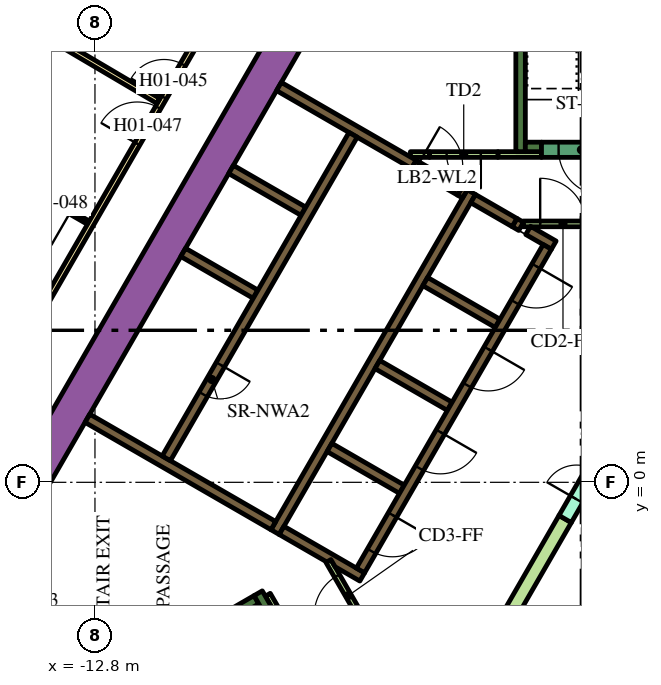
"""IFC4 building model, lengths in metres.
Left out: names, types, materials, properties, quantities, classifications, styles, units other than length and angle.
Written with IfcOpenShell. Run it as: python <this file> out.ifc"""

import sys

from ifc_helpers import new_model, si_unit, direction, frame, frame_2d, origin, place, context, subcontext, project, spatial, polyline, rectangle, outline, extrude, element, fill, save


model = new_model("IFC4")
c1 = context("Model", 3, precision=1e-05, world=origin(), true_north=direction((0.0, 1.0)))
c2 = subcontext(c1, "Body", "Model", "MODEL_VIEW")
j1 = project(units=[si_unit("LENGTHUNIT", "METRE"), si_unit("PLANEANGLEUNIT", "RADIAN")], contexts=[c1])
p1 = place(None, origin())
s1 = spatial("IfcSite", under=j1, at=p1, CompositionType="ELEMENT")
p2 = place(p1, origin())
s2 = spatial("IfcBuilding", under=s1, at=p2, CompositionType="ELEMENT")
p3 = place(p2, frame((0.0, 0.0, 35.4)))
s3 = spatial("IfcBuildingStorey", under=s2, at=p3, CompositionType="ELEMENT", Elevation=35.4)
p4 = place(p3, frame((-15.36, -1.503, 0.0), z_axis=(0.0, 0.0, 1.0), x_axis=(0.50000389221, 0.866023156604, 0.0)))
e1 = element("IfcWall", 1, at=p4, inside=s3, PredefinedType="SOLIDWALL", context=c2, shape_type="SweptSolid", body=[
    extrude(rectangle(XDim=21.0, YDim=0.9, at=frame_2d((10.5, 0.0))), origin(), (0.0, 0.0, 1.0), 3.9),
])
p5 = place(p3, frame((-1.6, 8.7, 0.0), z_axis=(0.0, 0.0, 1.0), x_axis=(0.0, 1.0, 0.0)))
e2 = element("IfcWall", 2, at=p5, inside=s3, PredefinedType="SOLIDWALL", context=c2, shape_type="SweptSolid", body=[
    extrude(rectangle(XDim=7.05, YDim=0.25, at=frame_2d((3.525, 0.0))), origin(), (0.0, 0.0, 1.0), 3.9),
])
p6 = place(p3, frame((-1.475, 8.825, 0.0), z_axis=(0.0, 0.0, 1.0), x_axis=(1.0, 0.0, 0.0)))
e3 = element("IfcWall", 3, at=p6, inside=s3, PredefinedType="SOLIDWALL", context=c2, shape_type="SweptSolid", body=[
    extrude(rectangle(XDim=0.425, YDim=0.25, at=frame_2d((0.212, 0.0))), origin(), (0.0, 0.0, 1.0), 3.9),
])
p7 = place(p3, frame((-14.44, -6.49, 0.0), z_axis=(0.0, 0.0, 1.0), x_axis=(0.866022966069, 0.500004222222, 0.0)))
e4 = element("IfcWall", 4, at=p7, inside=s3, PredefinedType="SOLIDWALL", context=c2, shape_type="SweptSolid", body=[
    extrude(rectangle(XDim=6.8, YDim=0.25, at=frame_2d((3.4, 0.0))), origin(), (0.0, 0.0, 1.0), 3.9),
])
p8 = place(p3, frame((-8.168, -3.503, 0.0), z_axis=(0.0, 0.0, 1.0), x_axis=(-0.499952099219, 0.866053057547, 0.0)))
e5 = element("IfcWall", 5, at=p8, inside=s3, PredefinedType="SOLIDWALL", context=c2, shape_type="SweptSolid", body=[
    extrude(rectangle(XDim=0.675, YDim=0.25, at=frame_2d((0.337, 0.0))), origin(), (0.0, 0.0, 1.0), 3.9),
])
p9 = place(p3, frame((-8.06, -1.311, 0.0), z_axis=(0.0, 0.0, 1.0), x_axis=(0.50000273126, 0.866023826885, 0.0)))
e6 = element("IfcWall", 6, at=p9, inside=s3, PredefinedType="SOLIDWALL", context=c2, shape_type="SweptSolid", body=[
    extrude(rectangle(XDim=10.33, YDim=0.25, at=frame_2d((5.165, 0.0))), origin(), (0.0, 0.0, 1.0), 3.9),
])
p10 = place(p3, frame((-1.758, 6.835, 0.0), z_axis=(0.0, 0.0, 1.0), x_axis=(0.865982457891, -0.500074377092, 0.0)))
e7 = element("IfcWall", 7, at=p10, inside=s3, PredefinedType="SOLIDWALL", context=c2, shape_type="SweptSolid", body=[
    extrude(rectangle(XDim=0.2, YDim=0.25, at=frame_2d((0.1, 0.0))), origin(), (0.0, 0.0, 1.0), 3.9),
])
p11 = place(p3, frame((-1.76, 6.836, 0.0), z_axis=(0.0, 0.0, 1.0), x_axis=(-0.865952863304, 0.500125622755, 0.0)))
e8 = element("IfcWall", 8, at=p11, inside=s3, PredefinedType="SOLIDWALL", context=c2, shape_type="SweptSolid", body=[
    extrude(rectangle(XDim=1.258, YDim=0.25, at=frame_2d((0.629, 0.0))), origin(), (0.0, 0.0, 1.0), 3.9),
])
p12 = place(p3, frame((-0.728, 6.24, 0.0), z_axis=(0.0, 0.0, 1.0), x_axis=(-0.865955664968, 0.500120771724, 0.0)))
e9 = element("IfcWall", 9, at=p12, inside=s3, PredefinedType="SOLIDWALL", context=c2, shape_type="SweptSolid", body=[
    extrude(rectangle(XDim=0.778, YDim=0.25, at=frame_2d((0.389, 0.0))), origin(), (0.0, 0.0, 1.0), 3.9),
])
for number, where, z_axis, x_axis in (
    (10, (-2.204, 4.182, 0.0), (0.0, 0.0, 1.0), (-0.866, 0.5, 0.0)),
    (11, (-5.369, 3.1, 0.0), (0.0, 0.0, 1.0), (0.866, -0.5, 0.0)),
    (12, (-4.724, -0.182, 0.0), (0.0, 0.0, 1.0), (-0.866, 0.5, 0.0)),
):
    element("IfcWall", number, at=place(p3, frame(where, z_axis=z_axis, x_axis=x_axis)), inside=s3, PredefinedType="SOLIDWALL", context=c2, shape_type="SweptSolid", body=[
        extrude(rectangle(XDim=2.2, YDim=0.25, at=frame_2d((1.1, 0.0))), origin(), (0.0, 0.0, 1.0), 3.9),
    ])
p13 = place(p3, origin())
e13 = element("IfcWall", 13, at=p13, inside=s3, PredefinedType="SOLIDWALL", context=c2, shape_type="SweptSolid", body=[
    extrude(outline(polyline([(-5.922, -2.257), (-5.922, -2.257), (-5.705, -2.382), (-5.83, -2.598), (-6.483, -2.221), (-6.591, -2.033), (-6.591, -2.033), (-6.7, -2.096), (-7.952, -1.373), (-7.827, -1.156), (-5.922, -2.257)])), origin(), (0.0, 0.0, 1.0), 3.9),
])
p14 = place(p3, frame((-8.106, -1.14, 0.0), z_axis=(0.0, 0.0, 1.0), x_axis=(-0.866000643155, 0.500042884217, 0.0)))
e14 = element("IfcWall", 14, at=p14, inside=s3, PredefinedType="SOLIDWALL", context=c2, shape_type="SweptSolid", body=[
    extrude(rectangle(XDim=5.65, YDim=0.25, at=frame_2d((2.825, 0.0))), origin(), (0.0, 0.0, 1.0), 3.9),
])
e15 = element("IfcWall", 15, at=p13, inside=s3, PredefinedType="SOLIDWALL", context=c2, shape_type="SweptSolid", body=[
    extrude(outline(polyline([(-3.128, 7.481), (-3.259, 7.557), (-3.134, 7.773), (-3.003, 7.698), (-3.128, 7.481)])), origin(), (0.0, 0.0, 1.0), 3.9),
])
for number, where, z_axis, x_axis in (
    (16, (-8.574, 4.95, 0.0), (0.0, 0.0, 1.0), (-0.866, 0.5, 0.0)),
    (17, (-7.314, 7.132, 0.0), (0.0, 0.0, 1.0), (-0.866, 0.5, 0.0)),
):
    element("IfcWall", number, at=place(p3, frame(where, z_axis=z_axis, x_axis=x_axis)), inside=s3, PredefinedType="SOLIDWALL", context=c2, shape_type="SweptSolid", body=[
        extrude(rectangle(XDim=2.2, YDim=0.25, at=frame_2d((1.1, 0.0))), origin(), (0.0, 0.0, 1.0), 3.9),
    ])
p15 = place(p3, frame((-7.959, 10.415, 0.0), z_axis=(0.0, 0.0, 1.0), x_axis=(0.866020958405, -0.500007699544, 0.0)))
e18 = element("IfcWall", 18, at=p15, inside=s3, PredefinedType="SOLIDWALL", context=c2, shape_type="SweptSolid", body=[
    extrude(rectangle(XDim=4.1, YDim=0.25, at=frame_2d((2.05, 0.0))), origin(), (0.0, 0.0, 1.0), 3.9),
])
p16 = place(p3, frame((-8.252, -2.958, 0.0), z_axis=(0.0, 0.0, 1.0), x_axis=(0.500174715838, -0.865924508047, 0.0)))
e19 = element("IfcWall", 19, at=p16, inside=s3, PredefinedType="PARTITIONING", context=c2, shape_type="SweptSolid", body=[
    extrude(rectangle(XDim=0.514, YDim=0.15, at=frame_2d((0.257, 0.0))), origin(), (0.0, 0.0, 1.0), 2.75),
])
p17 = place(p3, frame((-3.997, 8.625, 0.0), z_axis=(0.0, 0.0, 1.0), x_axis=(-1.0, 0.0, 0.0)))
e20 = element("IfcWall", 20, at=p17, inside=s3, PredefinedType="PARTITIONING", context=c2, shape_type="SweptSolid", body=[
    extrude(rectangle(XDim=0.502, YDim=0.15, at=frame_2d((0.251, 0.0))), origin(), (0.0, 0.0, 1.0), 2.75),
])
p18 = place(p3, frame((-2.196, 8.625, 0.0), z_axis=(0.0, 0.0, 1.0), x_axis=(1.0, 0.0, 0.0)))
e21 = element("IfcWall", 21, at=p18, inside=s3, PredefinedType="PARTITIONING", context=c2, shape_type="SweptSolid", body=[
    extrude(rectangle(XDim=1.146, YDim=0.15, at=frame_2d((0.573, 0.0))), origin(), (0.0, 0.0, 1.0), 2.75),
])
e22 = element("IfcWall", 22, at=p13, inside=s3, PredefinedType="PARTITIONING", context=c2, shape_type="SweptSolid", body=[
    extrude(outline(polyline([(-0.59, -0.872), (-0.265, -1.059), (-1.822, -3.756), (-2.147, -3.568), (-0.59, -0.872)])), origin(), (0.0, 0.0, 1.0), 2.75),
])
p19 = place(p3, frame((-6.008, 9.144, 0.0), z_axis=(0.0, 0.0, 1.0), x_axis=(-0.500006956611, -0.866021387346, 0.0)))
e23 = element("IfcWall", 23, at=p19, inside=s3, PredefinedType="SOLIDWALL", context=c2, shape_type="SweptSolid", body=[
    extrude(rectangle(XDim=9.83, YDim=0.25, at=frame_2d((4.915, 0.0))), origin(), (0.0, 0.0, 1.0), 3.9),
])
p20 = place(p19, frame((6.985, 0.0, 0.0)))
e24 = element("IfcOpeningElement", 24, at=p20, cuts=e23, PredefinedType="OPENING", context=c2, shape_type="SweptSolid", body=[
    extrude(rectangle(XDim=0.9, YDim=2.1, at=frame_2d((0.45, 1.05))), frame((0.0, 0.135, 0.0), z_axis=(0.0, -1.0, 0.0), x_axis=(1.0, 0.0, 0.0)), (0.0, 0.0, 1.0), 0.27),
])
p21 = place(p3, frame((-0.898, 6.194, 0.0), z_axis=(0.0, 0.0, 1.0), x_axis=(-0.499996202215, -0.866027596426, 0.0)))
e25 = element("IfcWall", 25, at=p21, inside=s3, PredefinedType="SOLIDWALL", context=c2, shape_type="SweptSolid", body=[
    extrude(rectangle(XDim=9.83, YDim=0.25, at=frame_2d((4.915, 0.0))), origin(), (0.0, 0.0, 1.0), 3.9),
])
p22 = place(p21, frame((0.585, 0.0, 0.0)))
e26 = element("IfcOpeningElement", 26, at=p22, cuts=e25, PredefinedType="OPENING", context=c2, shape_type="SweptSolid", body=[
    extrude(rectangle(XDim=1.1, YDim=2.1, at=frame_2d((0.55, 1.05))), frame((0.0, 0.135, 0.0), z_axis=(0.0, -1.0, 0.0), x_axis=(1.0, 0.0, 0.0)), (0.0, 0.0, 1.0), 0.27),
])
p23 = place(p21, frame((3.105, 0.0, 0.0)))
e27 = element("IfcOpeningElement", 27, at=p23, cuts=e25, PredefinedType="OPENING", context=c2, shape_type="SweptSolid", body=[
    extrude(rectangle(XDim=1.1, YDim=2.1, at=frame_2d((0.55, 1.05))), frame((0.0, 0.135, 0.0), z_axis=(0.0, -1.0, 0.0), x_axis=(1.0, 0.0, 0.0)), (0.0, 0.0, 1.0), 0.27),
])
p24 = place(p21, frame((5.625, 0.0, 0.0)))
e28 = element("IfcOpeningElement", 28, at=p24, cuts=e25, PredefinedType="OPENING", context=c2, shape_type="SweptSolid", body=[
    extrude(rectangle(XDim=1.1, YDim=2.1, at=frame_2d((0.55, 1.05))), frame((0.0, 0.135, 0.0), z_axis=(0.0, -1.0, 0.0), x_axis=(1.0, 0.0, 0.0)), (0.0, 0.0, 1.0), 0.27),
])
p25 = place(p21, frame((8.145, 0.0, 0.0)))
e29 = element("IfcOpeningElement", 29, at=p25, cuts=e25, PredefinedType="OPENING", context=c2, shape_type="SweptSolid", body=[
    extrude(rectangle(XDim=1.1, YDim=2.1, at=frame_2d((0.55, 1.05))), frame((0.0, 0.135, 0.0), z_axis=(0.0, -1.0, 0.0), x_axis=(1.0, 0.0, 0.0)), (0.0, 0.0, 1.0), 0.27),
])
p26 = place(p3, frame((1.05, 8.75, 0.0), z_axis=(0.0, 0.0, 1.0), x_axis=(-1.0, 0.0, 0.0)))
e30 = element("IfcWall", 30, at=p26, inside=s3, PredefinedType="SOLIDWALL", context=c2, shape_type="SweptSolid", body=[
    extrude(rectangle(XDim=2.1, YDim=0.4, at=frame_2d((1.05, 0.0))), origin(), (0.0, 0.0, 1.0), 3.9),
])
p27 = place(p26, frame((0.45, 0.0, 0.0)))
e31 = element("IfcOpeningElement", 31, at=p27, cuts=e30, PredefinedType="OPENING", context=c2, shape_type="SweptSolid", body=[
    extrude(rectangle(XDim=1.2, YDim=2.1, at=frame_2d((0.6, 1.05))), frame((0.0, 0.21, 0.0), z_axis=(0.0, -1.0, 0.0), x_axis=(1.0, 0.0, 0.0)), (0.0, 0.0, 1.0), 0.42),
])
p28 = place(p3, frame((-2.196, 8.625, 0.0), z_axis=(0.0, 0.0, 1.0), x_axis=(-1.0, 0.0, 0.0)))
e32 = element("IfcWall", 32, at=p28, inside=s3, PredefinedType="PARTITIONING", context=c2, shape_type="SweptSolid", body=[
    extrude(rectangle(XDim=1.8, YDim=0.15, at=frame_2d((0.9, 0.0))), origin(), (0.0, 0.0, 1.0), 2.75),
])
p29 = place(p28, frame((0.45, 0.0, 0.0)))
e33 = element("IfcOpeningElement", 33, at=p29, cuts=e32, PredefinedType="OPENING", context=c2, shape_type="SweptSolid", body=[
    extrude(rectangle(XDim=0.9, YDim=2.1, at=frame_2d((0.45, 1.05))), frame((0.0, 0.085, 0.0), z_axis=(0.0, -1.0, 0.0), x_axis=(1.0, 0.0, 0.0)), (0.0, 0.0, 1.0), 0.17),
])
p30 = place(p3, frame((-0.427, -0.966, 0.0), z_axis=(0.0, 0.0, 1.0), x_axis=(0.49994051562, 0.866059744384, 0.0)))
e34 = element("IfcWall", 34, at=p30, inside=s3, PredefinedType="PARTITIONING", context=c2, shape_type="SweptSolid", body=[
    extrude(rectangle(XDim=2.1, YDim=0.375, at=frame_2d((1.05, 0.0))), origin(), (0.0, 0.0, 1.0), 2.75),
])
p31 = place(p30, frame((0.6, 0.0, 0.0)))
e35 = element("IfcOpeningElement", 35, at=p31, cuts=e34, PredefinedType="OPENING", context=c2, shape_type="SweptSolid", body=[
    extrude(rectangle(XDim=0.9, YDim=2.1, at=frame_2d((0.45, 1.05))), frame((0.0, 0.198, 0.0), z_axis=(0.0, -1.0, 0.0), x_axis=(1.0, 0.0, 0.0)), (0.0, 0.0, 1.0), 0.395),
])
p32 = place(p3, frame((-1.534, 6.8, 0.0), z_axis=(0.0, 0.0, 1.0), x_axis=(1.0, 0.0, 0.0)))
e36 = element("IfcWall", 36, at=p32, inside=s3, PredefinedType="PARTITIONING", context=c2, shape_type="SweptSolid", body=[
    extrude(rectangle(XDim=2.1, YDim=0.15, at=frame_2d((1.05, 0.0))), origin(), (0.0, 0.0, 1.0), 2.75),
])
p33 = place(p32, frame((0.45, 0.0, 0.0)))
e37 = element("IfcOpeningElement", 37, at=p33, cuts=e36, PredefinedType="OPENING", context=c2, shape_type="SweptSolid", body=[
    extrude(rectangle(XDim=1.2, YDim=2.1, at=frame_2d((0.6, 1.05))), frame((0.0, 0.085, 0.0), z_axis=(0.0, -1.0, 0.0), x_axis=(1.0, 0.0, 0.0)), (0.0, 0.0, 1.0), 0.17),
])
p34 = place(p3, frame((-5.606, -3.89, 0.0), z_axis=(0.0, 0.0, 1.0), x_axis=(-0.500027713859, 0.866009402589, 0.0)))
e38 = element("IfcWall", 38, at=p34, inside=s3, PredefinedType="PARTITIONING", context=c2, shape_type="SweptSolid", body=[
    extrude(rectangle(XDim=2.1, YDim=0.15, at=frame_2d((1.05, 0.0))), origin(), (0.0, 0.0, 1.0), 2.75),
])
p35 = place(p34, frame((0.45, 0.0, 0.0)))
e39 = element("IfcOpeningElement", 39, at=p35, cuts=e38, PredefinedType="OPENING", context=c2, shape_type="SweptSolid", body=[
    extrude(rectangle(XDim=1.2, YDim=2.1, at=frame_2d((0.6, 1.05))), frame((0.0, 0.085, 0.0), z_axis=(0.0, -1.0, 0.0), x_axis=(1.0, 0.0, 0.0)), (0.0, 0.0, 1.0), 0.17),
])
p36 = place(p3, frame((-4.409, 8.365, 0.0), z_axis=(0.0, 0.0, 1.0), x_axis=(0.866034573852, -0.49998411664, 0.0)))
e40 = element("IfcWall", 40, at=p36, inside=s3, PredefinedType="SOLIDWALL", context=c2, shape_type="SweptSolid", body=[
    extrude(rectangle(XDim=1.4, YDim=0.25, at=frame_2d((0.7, 0.0))), origin(), (0.0, 0.0, 1.0), 3.9),
])
p37 = place(p36, frame((0.1, 0.0, 0.0)))
e41 = element("IfcOpeningElement", 41, at=p37, cuts=e40, PredefinedType="OPENING", context=c2, shape_type="SweptSolid", body=[
    extrude(rectangle(XDim=1.2, YDim=2.1, at=frame_2d((0.6, 1.05))), frame((0.0, 0.135, 0.0), z_axis=(0.0, -1.0, 0.0), x_axis=(1.0, 0.0, 0.0)), (0.0, 0.0, 1.0), 0.27),
])
p38 = place(p3, frame((-19.081, -3.9, 0.0), z_axis=(0.0, 0.0, 1.0), x_axis=(0.499998313975, 0.866026377209, 0.0)))
e42 = element("IfcWall", 42, at=p38, inside=s3, PredefinedType="PARTITIONING", context=c2, shape_type="SweptSolid", body=[
    extrude(rectangle(XDim=25.766, YDim=0.15, at=frame_2d((12.883, 0.0))), origin(), (0.0, 0.0, 1.0), 2.75),
])
p39 = place(p38, frame((24.586, 0.0, 0.0)))
e43 = element("IfcOpeningElement", 43, at=p39, cuts=e42, PredefinedType="OPENING", context=c2, shape_type="SweptSolid", body=[
    extrude(rectangle(XDim=1.0, YDim=2.1, at=frame_2d((0.5, 1.05))), frame((0.0, 0.085, 0.0), z_axis=(0.0, -1.0, 0.0), x_axis=(1.0, 0.0, 0.0)), (0.0, 0.0, 1.0), 0.17),
])
p40 = place(p38, frame((16.196, 0.0, 0.0)))
e44 = element("IfcOpeningElement", 44, at=p40, cuts=e42, PredefinedType="OPENING", context=c2, shape_type="SweptSolid", body=[
    extrude(rectangle(XDim=1.0, YDim=2.1, at=frame_2d((0.5, 1.05))), frame((0.0, 0.085, 0.0), z_axis=(0.0, -1.0, 0.0), x_axis=(1.0, 0.0, 0.0)), (0.0, 0.0, 1.0), 0.17),
])
p41 = place(p38, frame((14.789, 0.0, 0.0)))
e45 = element("IfcOpeningElement", 45, at=p41, cuts=e42, PredefinedType="OPENING", context=c2, shape_type="SweptSolid", body=[
    extrude(rectangle(XDim=1.1, YDim=2.1, at=frame_2d((0.55, 1.05))), frame((0.0, 0.085, 0.0), z_axis=(0.0, -1.0, 0.0), x_axis=(1.0, 0.0, 0.0)), (0.0, 0.0, 1.0), 0.17),
])
p42 = place(p38, frame((3.698, 0.0, 0.0)))
e46 = element("IfcOpeningElement", 46, at=p42, cuts=e42, PredefinedType="OPENING", context=c2, shape_type="SweptSolid", body=[
    extrude(rectangle(XDim=1.0, YDim=2.1, at=frame_2d((0.5, 1.05))), frame((0.0, 0.085, 0.0), z_axis=(0.0, -1.0, 0.0), x_axis=(1.0, 0.0, 0.0)), (0.0, 0.0, 1.0), 0.17),
])
p43 = place(p38, frame((1.531, 0.0, 0.0)))
e47 = element("IfcOpeningElement", 47, at=p43, cuts=e42, PredefinedType="OPENING", context=c2, shape_type="SweptSolid", body=[
    extrude(rectangle(XDim=0.9, YDim=2.1, at=frame_2d((0.45, 1.05))), frame((0.0, 0.085, 0.0), z_axis=(0.0, -1.0, 0.0), x_axis=(1.0, 0.0, 0.0)), (0.0, 0.0, 1.0), 0.17),
])
p44 = place(p3, frame((-17.856, 13.999, 0.0), z_axis=(0.0, 0.0, 1.0), x_axis=(0.861371519381, -0.507975497047, 0.0)))
e48 = element("IfcWall", 48, at=p44, inside=s3, PredefinedType="PARTITIONING", context=c2, shape_type="SweptSolid", body=[
    extrude(rectangle(XDim=7.804, YDim=0.15, at=frame_2d((3.902, 0.0))), origin(), (0.0, 0.0, 1.0), 2.75),
])
p45 = place(p3, frame((-12.972, 6.831, 0.0), z_axis=(0.0, 0.0, 1.0), x_axis=(-0.866018616679, 0.500011755427, 0.0)))
e49 = element("IfcWall", 49, at=p45, inside=s3, PredefinedType="PARTITIONING", context=c2, shape_type="SweptSolid", body=[
    extrude(rectangle(XDim=2.8, YDim=0.1, at=frame_2d((1.4, 0.0))), origin(), (0.0, 0.0, 1.0), 2.75),
])
p46 = place(p45, frame((0.55, 0.0, 0.0)))
e50 = element("IfcOpeningElement", 50, at=p46, cuts=e49, PredefinedType="OPENING", context=c2, shape_type="SweptSolid", body=[
    extrude(rectangle(XDim=1.0, YDim=2.1, at=frame_2d((0.5, 1.05))), frame((0.0, 0.06, 0.0), z_axis=(0.0, -1.0, 0.0), x_axis=(1.0, 0.0, 0.0)), (0.0, 0.0, 1.0), 0.12),
])
p47 = place(p20, origin())
e51 = element("IfcDoor", 51, at=p47, inside=s3, OperationType="SINGLE_SWING_LEFT", PredefinedType="DOOR", context=c2, shape_type="SweptSolid", body=[
    extrude(rectangle(XDim=0.9, YDim=2.1, at=frame_2d((0.45, 1.05))), frame((0.0, 0.025, 0.0), z_axis=(0.0, -1.0, 0.0), x_axis=(1.0, 0.0, 0.0)), (0.0, 0.0, 1.0), 0.05),
])
fill(e24, e51)
p48 = place(p22, origin())
e52 = element("IfcDoor", 52, at=p48, inside=s3, OperationType="DOUBLE_DOOR_SLIDING", PredefinedType="DOOR", context=c2, shape_type="SweptSolid", body=[
    extrude(rectangle(XDim=1.1, YDim=2.1, at=frame_2d((0.55, 1.05))), frame((0.0, 0.025, 0.0), z_axis=(0.0, -1.0, 0.0), x_axis=(1.0, 0.0, 0.0)), (0.0, 0.0, 1.0), 0.05),
])
fill(e26, e52)
p49 = place(p23, origin())
e53 = element("IfcDoor", 53, at=p49, inside=s3, OperationType="DOUBLE_DOOR_SLIDING", PredefinedType="DOOR", context=c2, shape_type="SweptSolid", body=[
    extrude(rectangle(XDim=1.1, YDim=2.1, at=frame_2d((0.55, 1.05))), frame((0.0, 0.025, 0.0), z_axis=(0.0, -1.0, 0.0), x_axis=(1.0, 0.0, 0.0)), (0.0, 0.0, 1.0), 0.05),
])
fill(e27, e53)
p50 = place(p24, origin())
e54 = element("IfcDoor", 54, at=p50, inside=s3, OperationType="DOUBLE_DOOR_SLIDING", PredefinedType="DOOR", context=c2, shape_type="SweptSolid", body=[
    extrude(rectangle(XDim=1.1, YDim=2.1, at=frame_2d((0.55, 1.05))), frame((0.0, 0.025, 0.0), z_axis=(0.0, -1.0, 0.0), x_axis=(1.0, 0.0, 0.0)), (0.0, 0.0, 1.0), 0.05),
])
fill(e28, e54)
p51 = place(p25, origin())
e55 = element("IfcDoor", 55, at=p51, inside=s3, OperationType="DOUBLE_DOOR_SLIDING", PredefinedType="DOOR", context=c2, shape_type="SweptSolid", body=[
    extrude(rectangle(XDim=1.1, YDim=2.1, at=frame_2d((0.55, 1.05))), frame((0.0, 0.025, 0.0), z_axis=(0.0, -1.0, 0.0), x_axis=(1.0, 0.0, 0.0)), (0.0, 0.0, 1.0), 0.05),
])
fill(e29, e55)
p52 = place(p27, origin())
e56 = element("IfcDoor", 56, at=p52, inside=s3, OperationType="SINGLE_SWING_LEFT", PredefinedType="DOOR", context=c2, shape_type="SweptSolid", body=[
    extrude(rectangle(XDim=1.2, YDim=2.1, at=frame_2d((0.6, 1.05))), frame((0.0, 0.025, 0.0), z_axis=(0.0, -1.0, 0.0), x_axis=(1.0, 0.0, 0.0)), (0.0, 0.0, 1.0), 0.05),
])
fill(e31, e56)
p53 = place(p29, origin())
e57 = element("IfcDoor", 57, at=p53, inside=s3, OperationType="SINGLE_SWING_LEFT", PredefinedType="DOOR", context=c2, shape_type="SweptSolid", body=[
    extrude(rectangle(XDim=0.9, YDim=2.1, at=frame_2d((0.45, 1.05))), frame((0.0, 0.025, 0.0), z_axis=(0.0, -1.0, 0.0), x_axis=(1.0, 0.0, 0.0)), (0.0, 0.0, 1.0), 0.05),
])
fill(e33, e57)
p54 = place(p31, origin())
e58 = element("IfcDoor", 58, at=p54, inside=s3, OperationType="SINGLE_SWING_LEFT", PredefinedType="DOOR", context=c2, shape_type="SweptSolid", body=[
    extrude(rectangle(XDim=0.9, YDim=2.1, at=frame_2d((0.45, 1.05))), frame((0.0, 0.025, 0.0), z_axis=(0.0, -1.0, 0.0), x_axis=(1.0, 0.0, 0.0)), (0.0, 0.0, 1.0), 0.05),
])
fill(e35, e58)
p55 = place(p33, origin())
e59 = element("IfcDoor", 59, at=p55, inside=s3, OperationType="SINGLE_SWING_LEFT", PredefinedType="DOOR", context=c2, shape_type="SweptSolid", body=[
    extrude(rectangle(XDim=1.2, YDim=2.1, at=frame_2d((0.6, 1.05))), frame((0.0, 0.025, 0.0), z_axis=(0.0, -1.0, 0.0), x_axis=(1.0, 0.0, 0.0)), (0.0, 0.0, 1.0), 0.05),
])
fill(e37, e59)
p56 = place(p35, origin())
e60 = element("IfcDoor", 60, at=p56, inside=s3, OperationType="SINGLE_SWING_LEFT", PredefinedType="DOOR", context=c2, shape_type="SweptSolid", body=[
    extrude(rectangle(XDim=1.2, YDim=2.1, at=frame_2d((0.6, 1.05))), frame((0.0, 0.025, 0.0), z_axis=(0.0, -1.0, 0.0), x_axis=(1.0, 0.0, 0.0)), (0.0, 0.0, 1.0), 0.05),
])
fill(e39, e60)
p57 = place(p37, origin())
e61 = element("IfcDoor", 61, at=p57, inside=s3, OperationType="SINGLE_SWING_LEFT", PredefinedType="DOOR", context=c2, shape_type="SweptSolid", body=[
    extrude(rectangle(XDim=1.2, YDim=2.1, at=frame_2d((0.6, 1.05))), frame((0.0, 0.025, 0.0), z_axis=(0.0, -1.0, 0.0), x_axis=(1.0, 0.0, 0.0)), (0.0, 0.0, 1.0), 0.05),
])
fill(e41, e61)
p58 = place(p40, origin())
e62 = element("IfcDoor", 62, at=p58, inside=s3, OperationType="SINGLE_SWING_LEFT", PredefinedType="DOOR", context=c2, shape_type="SweptSolid", body=[
    extrude(rectangle(XDim=1.0, YDim=2.1, at=frame_2d((0.5, 1.05))), frame((0.0, 0.025, 0.0), z_axis=(0.0, -1.0, 0.0), x_axis=(1.0, 0.0, 0.0)), (0.0, 0.0, 1.0), 0.05),
])
fill(e44, e62)
p59 = place(p41, origin())
e63 = element("IfcDoor", 63, at=p59, inside=s3, OperationType="SINGLE_SWING_RIGHT", PredefinedType="DOOR", context=c2, shape_type="SweptSolid", body=[
    extrude(rectangle(XDim=1.1, YDim=2.1, at=frame_2d((0.55, 1.05))), frame((0.0, 0.025, 0.0), z_axis=(0.0, -1.0, 0.0), x_axis=(1.0, 0.0, 0.0)), (0.0, 0.0, 1.0), 0.05),
])
fill(e45, e63)
p60 = place(p46, origin())
e64 = element("IfcDoor", 64, at=p60, inside=s3, OperationType="SINGLE_SWING_LEFT", PredefinedType="DOOR", context=c2, shape_type="SweptSolid", body=[
    extrude(rectangle(XDim=1.0, YDim=2.1, at=frame_2d((0.5, 1.05))), frame((0.0, 0.025, 0.0), z_axis=(0.0, -1.0, 0.0), x_axis=(1.0, 0.0, 0.0)), (0.0, 0.0, 1.0), 0.05),
])
fill(e50, e64)
save(model, sys.argv[1])
